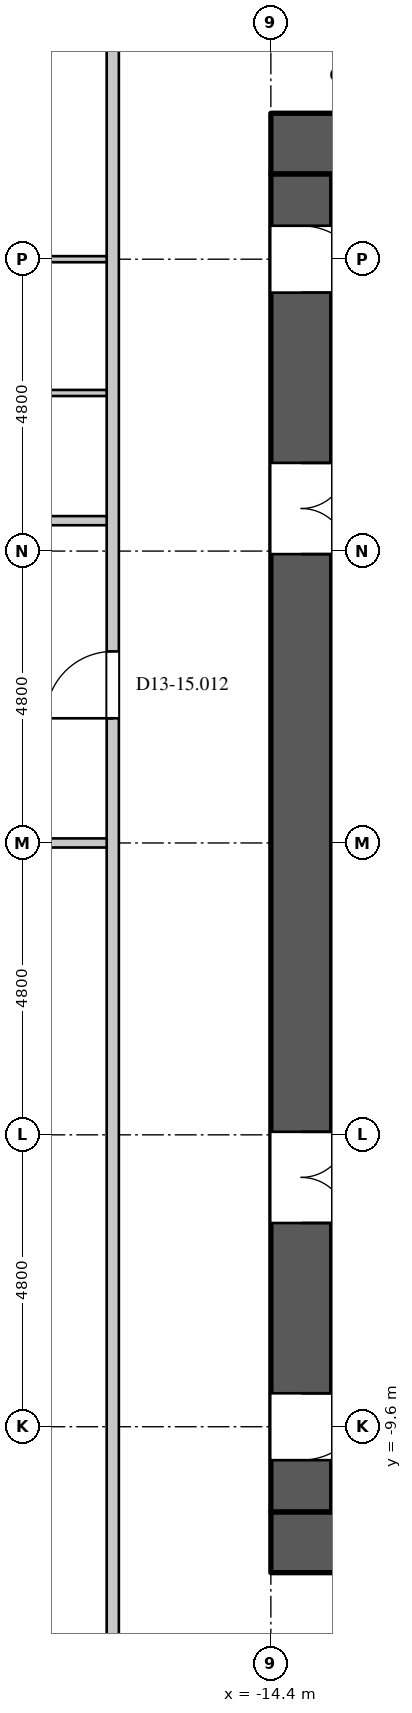
"""IFC4 building model, lengths in metres.
Left out: names, types, materials, properties, quantities, classifications, styles, units other than length and angle.
Written with IfcOpenShell. Run it as: python <this file> out.ifc"""

import sys

from ifc_helpers import new_model, si_unit, direction, frame, frame_2d, origin, place, context, subcontext, project, spatial, rectangle, extrude, element, fill, save


model = new_model("IFC4")
c1 = context("Model", 3, precision=1e-05, world=origin(), true_north=direction((0.0, 1.0)))
c2 = subcontext(c1, "Body", "Model", "MODEL_VIEW")
j1 = project(units=[si_unit("LENGTHUNIT", "METRE"), si_unit("PLANEANGLEUNIT", "RADIAN")], contexts=[c1])
p1 = place(None, origin())
s1 = spatial("IfcSite", under=j1, at=p1, CompositionType="ELEMENT")
p2 = place(p1, origin())
s2 = spatial("IfcBuilding", under=s1, at=p2, CompositionType="ELEMENT")
p3 = place(p2, frame((0.0, 0.0, 59.1)))
s3 = spatial("IfcBuildingStorey", under=s2, at=p3, CompositionType="ELEMENT", Elevation=59.1)
for number, where, z_axis, x_axis in (
    (1, (-14.4, 11.5, 0.0), (0.0, 0.0, 1.0), (1.0, 0.0, 0.0)),
    (2, (-14.4, -11.5, 0.0), (0.0, 0.0, 1.0), (1.0, 0.0, 0.0)),
):
    element("IfcWall", number, at=place(p3, frame(where, z_axis=z_axis, x_axis=x_axis)), inside=s3, PredefinedType="SHEAR", context=c2, shape_type="SweptSolid", body=[
        extrude(rectangle(XDim=28.8, YDim=1.0, at=frame_2d((14.4, 0.0))), origin(), (0.0, 0.0, 1.0), 4.2),
    ])
p4 = place(p3, frame((-13.9, -11.0, 0.0), z_axis=(0.0, 0.0, 1.0), x_axis=(0.0, 1.0, 0.0)))
e3 = element("IfcWall", 3, at=p4, inside=s3, PredefinedType="SHEAR", context=c2, shape_type="SweptSolid", body=[
    extrude(rectangle(XDim=22.0, YDim=1.0, at=frame_2d((11.0, 0.0))), origin(), (0.0, 0.0, 1.0), 4.2),
])
p5 = place(p4, frame((20.05, 0.0, 0.0)))
e4 = element("IfcOpeningElement", 4, at=p5, cuts=e3, PredefinedType="OPENING", context=c2, shape_type="SweptSolid", body=[
    extrude(rectangle(XDim=1.1, YDim=2.2, at=frame_2d((0.55, 1.1))), frame((0.0, 0.51, 0.0), z_axis=(0.0, -1.0, 0.0), x_axis=(1.0, 0.0, 0.0)), (0.0, 0.0, 1.0), 1.02),
])
p6 = place(p4, frame((0.85, 0.0, 0.0)))
e5 = element("IfcOpeningElement", 5, at=p6, cuts=e3, PredefinedType="OPENING", context=c2, shape_type="SweptSolid", body=[
    extrude(rectangle(XDim=1.1, YDim=2.2, at=frame_2d((0.55, 1.1))), frame((0.0, 0.51, 0.0), z_axis=(0.0, -1.0, 0.0), x_axis=(1.0, 0.0, 0.0)), (0.0, 0.0, 1.0), 1.02),
])
p7 = place(p4, frame((15.75, 0.0, 0.0)))
e6 = element("IfcOpeningElement", 6, at=p7, cuts=e3, PredefinedType="OPENING", context=c2, shape_type="SweptSolid", body=[
    extrude(rectangle(XDim=1.5, YDim=2.4, at=frame_2d((0.75, 1.2))), frame((0.0, 0.51, 0.0), z_axis=(0.0, -1.0, 0.0), x_axis=(1.0, 0.0, 0.0)), (0.0, 0.0, 1.0), 1.02),
])
p8 = place(p4, frame((4.75, 0.0, 0.0)))
e7 = element("IfcOpeningElement", 7, at=p8, cuts=e3, PredefinedType="OPENING", context=c2, shape_type="SweptSolid", body=[
    extrude(rectangle(XDim=1.5, YDim=2.4, at=frame_2d((0.75, 1.2))), frame((0.0, 0.51, 0.0), z_axis=(0.0, -1.0, 0.0), x_axis=(1.0, 0.0, 0.0)), (0.0, 0.0, 1.0), 1.02),
])
p9 = place(p3, frame((-17.0, -14.5, 0.0), z_axis=(0.0, 0.0, 1.0), x_axis=(0.0, 1.0, 0.0)))
e8 = element("IfcWall", 8, at=p9, inside=s3, PredefinedType="PARTITIONING", context=c2, shape_type="SweptSolid", body=[
    extrude(rectangle(XDim=29.0, YDim=0.2, at=frame_2d((14.5, 0.0))), origin(), (0.0, 0.0, 1.0), 3.95),
])
p10 = place(p9, frame((16.55, 0.0, 0.0)))
e9 = element("IfcOpeningElement", 9, at=p10, cuts=e8, PredefinedType="OPENING", context=c2, shape_type="SweptSolid", body=[
    extrude(rectangle(XDim=1.1, YDim=2.4, at=frame_2d((0.55, 1.2))), frame((0.0, 0.11, 0.0), z_axis=(0.0, -1.0, 0.0), x_axis=(1.0, 0.0, 0.0)), (0.0, 0.0, 1.0), 0.22),
])
p11 = place(p3, frame((-22.547, -11.885, 0.0), z_axis=(0.0, 0.0, 1.0), x_axis=(0.707106781187, -0.707106781187, 0.0)))
e10 = element("IfcWall", 10, at=p11, inside=s3, PredefinedType="PARTITIONING", context=c2, shape_type="SweptSolid", body=[
    extrude(rectangle(XDim=7.439, YDim=0.15, at=frame_2d((3.72, 0.0))), origin(), (0.0, 0.0, 1.0), 3.95),
])
p12 = place(p11, frame((3.95, 0.0, 0.0)))
e11 = element("IfcOpeningElement", 11, at=p12, cuts=e10, PredefinedType="OPENING", context=c2, shape_type="SweptSolid", body=[
    extrude(rectangle(XDim=0.95, YDim=2.2, at=frame_2d((0.475, 1.1))), frame((0.0, 0.085, 0.0), z_axis=(0.0, -1.0, 0.0), x_axis=(1.0, 0.0, 0.0)), (0.0, 0.0, 1.0), 0.17),
])
p13 = place(p3, frame((-22.547, 11.885, 0.0), z_axis=(0.0, 0.0, 1.0), x_axis=(0.707106781187, 0.707106781187, 0.0)))
e12 = element("IfcWall", 12, at=p13, inside=s3, PredefinedType="PARTITIONING", context=c2, shape_type="SweptSolid", body=[
    extrude(rectangle(XDim=9.83, YDim=0.15, at=frame_2d((4.915, 0.0))), origin(), (0.0, 0.0, 1.0), 3.95),
])
p14 = place(p13, frame((3.95, 0.0, 0.0)))
e13 = element("IfcOpeningElement", 13, at=p14, cuts=e12, PredefinedType="OPENING", context=c2, shape_type="SweptSolid", body=[
    extrude(rectangle(XDim=0.95, YDim=2.2, at=frame_2d((0.475, 1.1))), frame((0.0, 0.085, 0.0), z_axis=(0.0, -1.0, 0.0), x_axis=(1.0, 0.0, 0.0)), (0.0, 0.0, 1.0), 0.17),
])
p15 = place(p13, frame((8.25, 0.0, 0.0)))
e14 = element("IfcOpeningElement", 14, at=p15, cuts=e12, PredefinedType="OPENING", context=c2, shape_type="SweptSolid", body=[
    extrude(rectangle(XDim=0.95, YDim=2.2, at=frame_2d((0.475, 1.1))), frame((0.0, 0.085, 0.0), z_axis=(0.0, -1.0, 0.0), x_axis=(1.0, 0.0, 0.0)), (0.0, 0.0, 1.0), 0.17),
])
p16 = place(p3, frame((-21.725, 5.3, 0.0), z_axis=(0.0, 0.0, 1.0), x_axis=(1.0, 0.0, 0.0)))
e15 = element("IfcWall", 15, at=p16, inside=s3, PredefinedType="PARTITIONING", context=c2, shape_type="SweptSolid", body=[
    extrude(rectangle(XDim=4.625, YDim=0.15, at=frame_2d((2.312, 0.0))), origin(), (0.0, 0.0, 1.0), 3.95),
])
p17 = place(p16, frame((1.85, 0.0, 0.0)))
e16 = element("IfcOpeningElement", 16, at=p17, cuts=e15, PredefinedType="OPENING", context=c2, shape_type="SweptSolid", body=[
    extrude(rectangle(XDim=0.95, YDim=2.2, at=frame_2d((0.475, 1.1))), frame((0.0, 0.085, 0.0), z_axis=(0.0, -1.0, 0.0), x_axis=(1.0, 0.0, 0.0)), (0.0, 0.0, 1.0), 0.17),
])
p18 = place(p3, frame((-18.38, 0.0, 0.0), z_axis=(0.0, 0.0, 1.0), x_axis=(1.0, 0.0, 0.0)))
e17 = element("IfcWall", 17, at=p18, inside=s3, PredefinedType="PARTITIONING", context=c2, shape_type="SweptSolid", body=[
    extrude(rectangle(XDim=1.28, YDim=0.15, at=frame_2d((0.64, 0.0))), origin(), (0.0, 0.0, 1.0), 3.95),
])
p19 = place(p3, frame((-21.78, 9.6, 0.0), z_axis=(0.0, 0.0, 1.0), x_axis=(1.0, 0.0, 0.0)))
e18 = element("IfcWall", 18, at=p19, inside=s3, PredefinedType="PARTITIONING", context=c2, shape_type="SweptSolid", body=[
    extrude(rectangle(XDim=4.68, YDim=0.1, at=frame_2d((2.34, 0.0))), origin(), (0.0, 0.0, 1.0), 3.95),
])
p20 = place(p19, frame((1.95, 0.0, 0.0)))
e19 = element("IfcOpeningElement", 19, at=p20, cuts=e18, PredefinedType="OPENING", context=c2, shape_type="SweptSolid", body=[
    extrude(rectangle(XDim=0.9, YDim=2.2, at=frame_2d((0.45, 1.1))), frame((0.0, 0.06, 0.0), z_axis=(0.0, -1.0, 0.0), x_axis=(1.0, 0.0, 0.0)), (0.0, 0.0, 1.0), 0.12),
])
p21 = place(p3, frame((-21.725, 7.4, 0.0), z_axis=(0.0, 0.0, 1.0), x_axis=(1.0, 0.0, 0.0)))
e20 = element("IfcWall", 20, at=p21, inside=s3, PredefinedType="PARTITIONING", context=c2, shape_type="SweptSolid", body=[
    extrude(rectangle(XDim=4.625, YDim=0.1, at=frame_2d((2.312, 0.0))), origin(), (0.0, 0.0, 1.0), 3.95),
])
p22 = place(p5, origin())
e21 = element("IfcDoor", 21, at=p22, inside=s3, OperationType="SINGLE_SWING_RIGHT", PredefinedType="DOOR", context=c2, shape_type="SweptSolid", body=[
    extrude(rectangle(XDim=1.1, YDim=2.2, at=frame_2d((0.55, 1.1))), frame((0.0, -0.445, 0.0), z_axis=(0.0, -1.0, 0.0), x_axis=(1.0, 0.0, 0.0)), (0.0, 0.0, 1.0), 0.05),
])
fill(e4, e21)
p23 = place(p6, origin())
e22 = element("IfcDoor", 22, at=p23, inside=s3, OperationType="SINGLE_SWING_LEFT", PredefinedType="DOOR", context=c2, shape_type="SweptSolid", body=[
    extrude(rectangle(XDim=1.1, YDim=2.2, at=frame_2d((0.55, 1.1))), frame((0.0, -0.445, 0.0), z_axis=(0.0, -1.0, 0.0), x_axis=(1.0, 0.0, 0.0)), (0.0, 0.0, 1.0), 0.05),
])
fill(e5, e22)
p24 = place(p7, origin())
e23 = element("IfcDoor", 23, at=p24, inside=s3, OperationType="DOUBLE_DOOR_SINGLE_SWING", PredefinedType="DOOR", context=c2, shape_type="SweptSolid", body=[
    extrude(rectangle(XDim=1.5, YDim=2.4, at=frame_2d((0.75, 1.2))), frame((0.0, -0.445, 0.0), z_axis=(0.0, -1.0, 0.0), x_axis=(1.0, 0.0, 0.0)), (0.0, 0.0, 1.0), 0.05),
])
fill(e6, e23)
p25 = place(p8, origin())
e24 = element("IfcDoor", 24, at=p25, inside=s3, OperationType="DOUBLE_DOOR_SINGLE_SWING", PredefinedType="DOOR", context=c2, shape_type="SweptSolid", body=[
    extrude(rectangle(XDim=1.5, YDim=2.4, at=frame_2d((0.75, 1.2))), frame((0.0, -0.445, 0.0), z_axis=(0.0, -1.0, 0.0), x_axis=(1.0, 0.0, 0.0)), (0.0, 0.0, 1.0), 0.05),
])
fill(e7, e24)
p26 = place(p10, origin())
e25 = element("IfcDoor", 25, at=p26, inside=s3, OperationType="SINGLE_SWING_LEFT", PredefinedType="DOOR", context=c2, shape_type="SweptSolid", body=[
    extrude(rectangle(XDim=1.1, YDim=2.4, at=frame_2d((0.55, 1.2))), frame((0.0, 0.025, 0.0), z_axis=(0.0, -1.0, 0.0), x_axis=(1.0, 0.0, 0.0)), (0.0, 0.0, 1.0), 0.05),
])
fill(e9, e25)
save(model, sys.argv[1])
